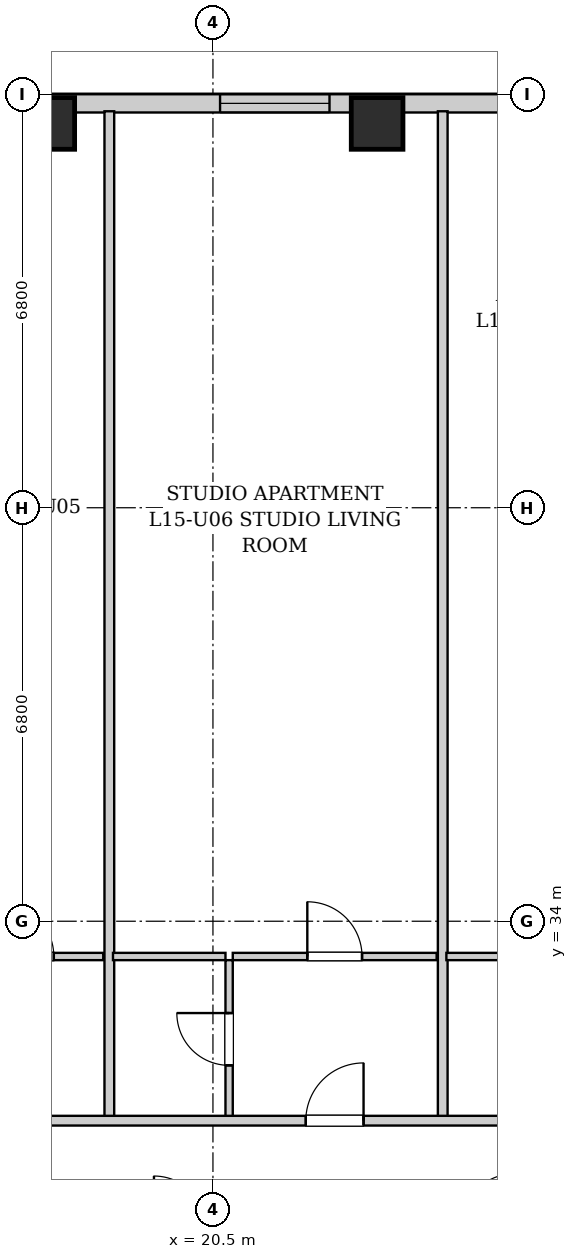
"""IFC4 building model, lengths in metres.
Left out: names, types, materials, properties, quantities, classifications, styles, units other than length and angle.
Written with IfcOpenShell. Run it as: python <this file> out.ifc"""

import sys

from ifc_helpers import new_model, si_unit, direction, frame, frame_2d, origin, origin_2d, place, context, subcontext, project, spatial, rectangle, extrude, element, fill, save


model = new_model("IFC4")
c1 = context("Model", 3, precision=1e-05, world=origin(), true_north=direction((0.0, 1.0)))
c2 = subcontext(c1, "Body", "Model", "MODEL_VIEW")
j1 = project(units=[si_unit("LENGTHUNIT", "METRE"), si_unit("PLANEANGLEUNIT", "RADIAN")], contexts=[c1])
p1 = place(None, origin())
s1 = spatial("IfcSite", under=j1, at=p1, CompositionType="ELEMENT")
p2 = place(p1, origin())
s2 = spatial("IfcBuilding", under=s1, at=p2, CompositionType="ELEMENT")
p3 = place(p2, frame((0.0, 0.0, 57.8)))
s3 = spatial("IfcBuildingStorey", under=s2, at=p3, CompositionType="ELEMENT", Elevation=57.8)
for number, where, z_axis, x_axis in (
    (1, (17.8, 47.12, 0.0), (0.0, 0.0, 1.0), (1.0, 0.0, 0.0)),
    (2, (23.2, 47.12, 0.0), (0.0, 0.0, 1.0), (1.0, 0.0, 0.0)),
):
    element("IfcColumn", number, at=place(p3, frame(where, z_axis=z_axis, x_axis=x_axis)), inside=s3, PredefinedType="COLUMN", context=c2, shape_type="SweptSolid", body=[
        extrude(rectangle(XDim=0.85, YDim=0.85, at=origin_2d()), origin(), (0.0, 0.0, 1.0), 3.2),
    ])
p4 = place(p3, frame((10.0, 47.45, 0.0), z_axis=(0.0, 0.0, 1.0), x_axis=(1.0, 0.0, 0.0)))
e3 = element("IfcWall", 3, at=p4, inside=s3, PredefinedType="SOLIDWALL", context=c2, shape_type="SweptSolid", body=[
    extrude(rectangle(XDim=27.55, YDim=0.3, at=frame_2d((13.775, 0.0))), origin(), (0.0, 0.0, 1.0), 1.975),
])
p5 = place(p4, frame((1.735, 0.0, 0.55)))
e4 = element("IfcOpeningElement", 4, at=p5, cuts=e3, PredefinedType="OPENING", context=c2, shape_type="SweptSolid", body=[
    extrude(rectangle(XDim=1.8, YDim=1.2, at=frame_2d((0.9, 0.6))), frame((0.0, 0.16, 0.0), z_axis=(0.0, -1.0, 0.0), x_axis=(1.0, 0.0, 0.0)), (0.0, 0.0, 1.0), 0.32),
])
p6 = place(p4, frame((5.415, 0.0, 0.55)))
e5 = element("IfcOpeningElement", 5, at=p6, cuts=e3, PredefinedType="OPENING", context=c2, shape_type="SweptSolid", body=[
    extrude(rectangle(XDim=1.8, YDim=1.2, at=frame_2d((0.9, 0.6))), frame((0.0, 0.16, 0.0), z_axis=(0.0, -1.0, 0.0), x_axis=(1.0, 0.0, 0.0)), (0.0, 0.0, 1.0), 0.32),
])
p7 = place(p4, frame((10.617, 0.0, 0.55)))
e6 = element("IfcOpeningElement", 6, at=p7, cuts=e3, PredefinedType="OPENING", context=c2, shape_type="SweptSolid", body=[
    extrude(rectangle(XDim=1.8, YDim=1.2, at=frame_2d((0.9, 0.6))), frame((0.0, 0.16, 0.0), z_axis=(0.0, -1.0, 0.0), x_axis=(1.0, 0.0, 0.0)), (0.0, 0.0, 1.0), 0.32),
])
p8 = place(p4, frame((17.5, 0.0, 0.55)))
e7 = element("IfcOpeningElement", 7, at=p8, cuts=e3, PredefinedType="OPENING", context=c2, shape_type="SweptSolid", body=[
    extrude(rectangle(XDim=0.85, YDim=1.2, at=frame_2d((0.425, 0.6))), frame((0.0, 0.16, 0.0), z_axis=(0.0, -1.0, 0.0), x_axis=(1.0, 0.0, 0.0)), (0.0, 0.0, 1.0), 0.32),
])
p9 = place(p4, frame((19.349, 0.0, 0.55)))
e8 = element("IfcOpeningElement", 8, at=p9, cuts=e3, PredefinedType="OPENING", context=c2, shape_type="SweptSolid", body=[
    extrude(rectangle(XDim=1.8, YDim=1.2, at=frame_2d((0.9, 0.6))), frame((0.0, 0.16, 0.0), z_axis=(0.0, -1.0, 0.0), x_axis=(1.0, 0.0, 0.0)), (0.0, 0.0, 1.0), 0.32),
])
p10 = place(p4, frame((24.769, 0.0, 0.55)))
e9 = element("IfcOpeningElement", 9, at=p10, cuts=e3, PredefinedType="OPENING", context=c2, shape_type="SweptSolid", body=[
    extrude(rectangle(XDim=1.8, YDim=1.2, at=frame_2d((0.9, 0.6))), frame((0.0, 0.16, 0.0), z_axis=(0.0, -1.0, 0.0), x_axis=(1.0, 0.0, 0.0)), (0.0, 0.0, 1.0), 0.32),
])
p11 = place(p3, frame((16.17, 33.42, 0.0), z_axis=(0.0, 0.0, 1.0), x_axis=(1.0, 0.0, 0.0)))
e10 = element("IfcWall", 10, at=p11, inside=s3, PredefinedType="PARTITIONING", context=c2, shape_type="SweptSolid", body=[
    extrude(rectangle(XDim=2.526, YDim=0.12, at=frame_2d((1.263, 0.0))), origin(), (0.0, 0.0, 1.0), 2.94),
])
p12 = place(p11, frame((0.813, 0.0, 0.0)))
e11 = element("IfcOpeningElement", 11, at=p12, cuts=e10, PredefinedType="OPENING", context=c2, shape_type="SweptSolid", body=[
    extrude(rectangle(XDim=0.9, YDim=2.05, at=frame_2d((0.45, 1.025))), frame((0.0, 0.07, 0.0), z_axis=(0.0, -1.0, 0.0), x_axis=(1.0, 0.0, 0.0)), (0.0, 0.0, 1.0), 0.14),
])
p13 = place(p3, frame((18.796, 30.76, 0.0), z_axis=(0.0, 0.0, 1.0), x_axis=(0.0, 1.0, 0.0)))
e12 = element("IfcWall", 12, at=p13, inside=s3, PredefinedType="PARTITIONING", context=c2, shape_type="SweptSolid", body=[
    extrude(rectangle(XDim=16.56, YDim=0.16, at=frame_2d((8.28, 0.0))), origin(), (0.0, 0.0, 1.0), 2.94),
])
p14 = place(p3, frame((20.766, 30.76, 0.0), z_axis=(0.0, 0.0, 1.0), x_axis=(0.0, 1.0, 0.0)))
e13 = element("IfcWall", 13, at=p14, inside=s3, PredefinedType="PARTITIONING", context=c2, shape_type="SweptSolid", body=[
    extrude(rectangle(XDim=2.6, YDim=0.12, at=frame_2d((1.3, 0.0))), origin(), (0.0, 0.0, 1.0), 2.94),
])
p15 = place(p14, frame((0.87, 0.0, 0.0)))
e14 = element("IfcOpeningElement", 14, at=p15, cuts=e13, PredefinedType="OPENING", context=c2, shape_type="SweptSolid", body=[
    extrude(rectangle(XDim=0.86, YDim=2.05, at=frame_2d((0.43, 1.025))), frame((0.0, 0.07, 0.0), z_axis=(0.0, -1.0, 0.0), x_axis=(1.0, 0.0, 0.0)), (0.0, 0.0, 1.0), 0.14),
])
p16 = place(p3, frame((18.856, 33.42, 0.0), z_axis=(0.0, 0.0, 1.0), x_axis=(1.0, 0.0, 0.0)))
e15 = element("IfcWall", 15, at=p16, inside=s3, PredefinedType="PARTITIONING", context=c2, shape_type="SweptSolid", body=[
    extrude(rectangle(XDim=1.85, YDim=0.12, at=frame_2d((0.925, 0.0))), origin(), (0.0, 0.0, 1.0), 2.94),
])
p17 = place(p3, frame((20.826, 33.42, 0.0), z_axis=(0.0, 0.0, 1.0), x_axis=(1.0, 0.0, 0.0)))
e16 = element("IfcWall", 16, at=p17, inside=s3, PredefinedType="PARTITIONING", context=c2, shape_type="SweptSolid", body=[
    extrude(rectangle(XDim=3.353, YDim=0.12, at=frame_2d((1.677, 0.0))), origin(), (0.0, 0.0, 1.0), 2.94),
])
p18 = place(p17, frame((1.226, 0.0, 0.0)))
e17 = element("IfcOpeningElement", 17, at=p18, cuts=e16, PredefinedType="OPENING", context=c2, shape_type="SweptSolid", body=[
    extrude(rectangle(XDim=0.9, YDim=2.05, at=frame_2d((0.45, 1.025))), frame((0.0, 0.07, 0.0), z_axis=(0.0, -1.0, 0.0), x_axis=(1.0, 0.0, 0.0)), (0.0, 0.0, 1.0), 0.14),
])
p19 = place(p3, frame((24.279, 30.76, 0.0), z_axis=(0.0, 0.0, 1.0), x_axis=(0.0, 1.0, 0.0)))
e18 = element("IfcWall", 18, at=p19, inside=s3, PredefinedType="PARTITIONING", context=c2, shape_type="SweptSolid", body=[
    extrude(rectangle(XDim=16.56, YDim=0.16, at=frame_2d((8.28, 0.0))), origin(), (0.0, 0.0, 1.0), 2.94),
])
p20 = place(p3, frame((24.339, 33.42, 0.0), z_axis=(0.0, 0.0, 1.0), x_axis=(1.0, 0.0, 0.0)))
e19 = element("IfcWall", 19, at=p20, inside=s3, PredefinedType="PARTITIONING", context=c2, shape_type="SweptSolid", body=[
    extrude(rectangle(XDim=2.4, YDim=0.12, at=frame_2d((1.2, 0.0))), origin(), (0.0, 0.0, 1.0), 2.94),
])
p21 = place(p3, frame((10.05, 30.72, 0.0), z_axis=(0.0, 0.0, 1.0), x_axis=(1.0, 0.0, 0.0)))
e20 = element("IfcWall", 20, at=p21, inside=s3, PredefinedType="PARTITIONING", context=c2, shape_type="SweptSolid", body=[
    extrude(rectangle(XDim=33.9, YDim=0.16, at=frame_2d((16.95, 0.0))), origin(), (0.0, 0.0, 1.0), 2.94),
])
p22 = place(p21, frame((3.8, 0.0, 0.0)))
e21 = element("IfcOpeningElement", 21, at=p22, cuts=e20, PredefinedType="OPENING", context=c2, shape_type="SweptSolid", body=[
    extrude(rectangle(XDim=0.95, YDim=2.1, at=frame_2d((0.475, 1.05))), frame((0.0, 0.09, 0.0), z_axis=(0.0, -1.0, 0.0), x_axis=(1.0, 0.0, 0.0)), (0.0, 0.0, 1.0), 0.18),
])
p23 = place(p21, frame((11.977, 0.0, 0.0)))
e22 = element("IfcOpeningElement", 22, at=p23, cuts=e20, PredefinedType="OPENING", context=c2, shape_type="SweptSolid", body=[
    extrude(rectangle(XDim=0.95, YDim=2.1, at=frame_2d((0.475, 1.05))), frame((0.0, 0.09, 0.0), z_axis=(0.0, -1.0, 0.0), x_axis=(1.0, 0.0, 0.0)), (0.0, 0.0, 1.0), 0.18),
])
p24 = place(p21, frame((18.09, 0.0, 0.0)))
e23 = element("IfcOpeningElement", 23, at=p24, cuts=e20, PredefinedType="OPENING", context=c2, shape_type="SweptSolid", body=[
    extrude(rectangle(XDim=0.95, YDim=2.1, at=frame_2d((0.475, 1.05))), frame((0.0, 0.09, 0.0), z_axis=(0.0, -1.0, 0.0), x_axis=(1.0, 0.0, 0.0)), (0.0, 0.0, 1.0), 0.18),
])
p25 = place(p21, frame((30.956, 0.0, 0.0)))
e24 = element("IfcOpeningElement", 24, at=p25, cuts=e20, PredefinedType="OPENING", context=c2, shape_type="SweptSolid", body=[
    extrude(rectangle(XDim=0.95, YDim=2.1, at=frame_2d((0.475, 1.05))), frame((0.0, 0.09, 0.0), z_axis=(0.0, -1.0, 0.0), x_axis=(1.0, 0.0, 0.0)), (0.0, 0.0, 1.0), 0.18),
])
p26 = place(p12, origin())
e25 = element("IfcDoor", 25, at=p26, inside=s3, OperationType="SINGLE_SWING_LEFT", PredefinedType="DOOR", context=c2, shape_type="SweptSolid", body=[
    extrude(rectangle(XDim=0.9, YDim=2.05, at=frame_2d((0.45, 1.025))), frame((0.0, 0.025, 0.0), z_axis=(0.0, -1.0, 0.0), x_axis=(1.0, 0.0, 0.0)), (0.0, 0.0, 1.0), 0.05),
])
fill(e11, e25)
p27 = place(p15, origin())
e26 = element("IfcDoor", 26, at=p27, inside=s3, OperationType="SINGLE_SWING_RIGHT", PredefinedType="DOOR", context=c2, shape_type="SweptSolid", body=[
    extrude(rectangle(XDim=0.86, YDim=2.05, at=frame_2d((0.43, 1.025))), frame((0.0, 0.025, 0.0), z_axis=(0.0, -1.0, 0.0), x_axis=(1.0, 0.0, 0.0)), (0.0, 0.0, 1.0), 0.05),
])
fill(e14, e26)
p28 = place(p18, origin())
e27 = element("IfcDoor", 27, at=p28, inside=s3, OperationType="SINGLE_SWING_LEFT", PredefinedType="DOOR", context=c2, shape_type="SweptSolid", body=[
    extrude(rectangle(XDim=0.9, YDim=2.05, at=frame_2d((0.45, 1.025))), frame((0.0, 0.025, 0.0), z_axis=(0.0, -1.0, 0.0), x_axis=(1.0, 0.0, 0.0)), (0.0, 0.0, 1.0), 0.05),
])
fill(e17, e27)
p29 = place(p23, origin())
e28 = element("IfcDoor", 28, at=p29, inside=s3, OperationType="SINGLE_SWING_RIGHT", PredefinedType="DOOR", context=c2, shape_type="SweptSolid", body=[
    extrude(rectangle(XDim=0.95, YDim=2.1, at=frame_2d((0.475, 1.05))), frame((0.0, 0.025, 0.0), z_axis=(0.0, -1.0, 0.0), x_axis=(1.0, 0.0, 0.0)), (0.0, 0.0, 1.0), 0.05),
])
fill(e22, e28)
p30 = place(p7, origin())
e29 = element("IfcWindow", 29, at=p30, inside=s3, PartitioningType="DOUBLE_PANEL_VERTICAL", PredefinedType="WINDOW", context=c2, shape_type="SweptSolid", body=[
    extrude(rectangle(XDim=1.8, YDim=1.2, at=frame_2d((0.9, 0.6))), frame((0.0, 0.03, 0.0), z_axis=(0.0, -1.0, 0.0), x_axis=(1.0, 0.0, 0.0)), (0.0, 0.0, 1.0), 0.06),
])
fill(e6, e29)
save(model, sys.argv[1])
